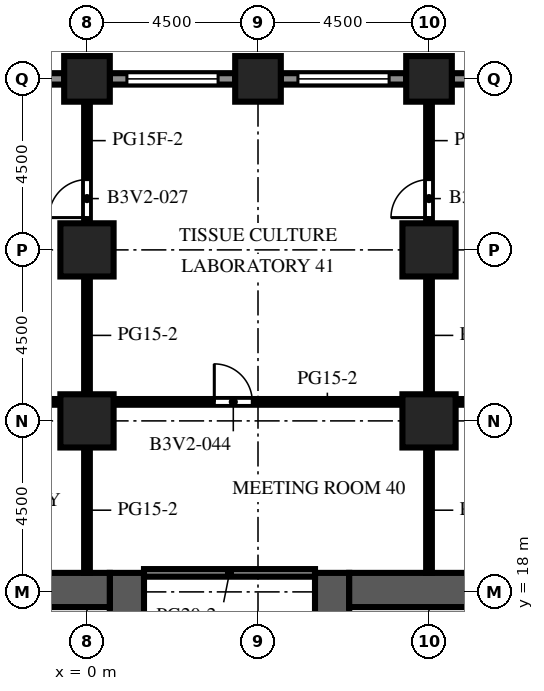
"""IFC4 building model, lengths in metres.
Left out: names, types, materials, properties, quantities, classifications, styles, units other than length and angle.
Written with IfcOpenShell. Run it as: python <this file> out.ifc"""

import sys

from ifc_helpers import new_model, si_unit, direction, frame, frame_2d, origin, origin_2d, place, context, subcontext, project, spatial, rectangle, extrude, element, fill, save


model = new_model("IFC4")
c1 = context("Model", 3, precision=1e-05, world=origin(), true_north=direction((0.0, 1.0)))
c2 = subcontext(c1, "Body", "Model", "MODEL_VIEW")
j1 = project(units=[si_unit("LENGTHUNIT", "METRE"), si_unit("PLANEANGLEUNIT", "RADIAN")], contexts=[c1])
p1 = place(None, origin())
s1 = spatial("IfcSite", under=j1, at=p1, CompositionType="ELEMENT")
p2 = place(p1, origin())
s2 = spatial("IfcBuilding", under=s1, at=p2, CompositionType="ELEMENT")
p3 = place(p2, frame((0.0, 0.0, 106.6)))
s3 = spatial("IfcBuildingStorey", under=s2, at=p3, CompositionType="ELEMENT", Elevation=106.6)
for number, where, z_axis, x_axis in (
    (1, (0.0, 31.5, 0.0), (0.0, 0.0, 1.0), (1.0, 0.0, 0.0)),
    (2, (4.5, 31.5, 0.0), (0.0, 0.0, 1.0), (1.0, 0.0, 0.0)),
    (3, (9.0, 31.5, 0.0), (0.0, 0.0, 1.0), (1.0, 0.0, 0.0)),
):
    element("IfcColumn", number, at=place(p3, frame(where, z_axis=z_axis, x_axis=x_axis)), inside=s3, PredefinedType="COLUMN", context=c2, shape_type="SweptSolid", body=[
        extrude(rectangle(XDim=1.2, YDim=1.2, at=origin_2d()), origin(), (0.0, 0.0, 1.0), 4.1),
    ])
for number, where, z_axis, x_axis in (
    (4, (0.0, 22.5, 0.0), (0.0, 0.0, 1.0), (1.0, 0.0, 0.0)),
    (5, (0.0, 27.0, 0.0), (0.0, 0.0, 1.0), (1.0, 0.0, 0.0)),
    (6, (9.0, 22.5, 0.0), (0.0, 0.0, 1.0), (1.0, 0.0, 0.0)),
    (7, (9.0, 27.0, 0.0), (0.0, 0.0, 1.0), (1.0, 0.0, 0.0)),
):
    element("IfcColumn", number, at=place(p3, frame(where, z_axis=z_axis, x_axis=x_axis)), inside=s3, PredefinedType="COLUMN", context=c2, shape_type="SweptSolid", body=[
        extrude(rectangle(XDim=1.4, YDim=1.4, at=origin_2d()), origin(), (0.0, 0.0, 1.0), 4.1),
    ])
p4 = place(p3, frame((1.05, -9.0, 0.0), z_axis=(0.0, 0.0, 1.0), x_axis=(0.0, 1.0, 0.0)))
e8 = element("IfcWall", 8, at=p4, inside=s3, PredefinedType="SHEAR", context=c2, shape_type="SweptSolid", body=[
    extrude(rectangle(XDim=27.5, YDim=0.9, at=frame_2d((13.75, 0.0))), origin(), (0.0, 0.0, 1.0), 4.1),
])
p5 = place(p4, frame((12.55, 0.0, 0.0)))
e9 = element("IfcOpeningElement", 9, at=p5, cuts=e8, PredefinedType="OPENING", context=c2, shape_type="SweptSolid", body=[
    extrude(rectangle(XDim=2.4, YDim=2.4, at=frame_2d((1.2, 1.2))), frame((0.0, 0.46, 0.0), z_axis=(0.0, -1.0, 0.0), x_axis=(1.0, 0.0, 0.0)), (0.0, 0.0, 1.0), 0.92),
])
p6 = place(p4, frame((3.893, 0.0, 0.0)))
e10 = element("IfcOpeningElement", 10, at=p6, cuts=e8, PredefinedType="OPENING", context=c2, shape_type="SweptSolid", body=[
    extrude(rectangle(XDim=0.923, YDim=2.1, at=frame_2d((0.461, 1.05))), frame((0.0, 0.46, 0.0), z_axis=(0.0, -1.0, 0.0), x_axis=(1.0, 0.0, 0.0)), (0.0, 0.0, 1.0), 0.92),
])
p7 = place(p4, frame((23.427, 0.0, 0.0)))
e11 = element("IfcOpeningElement", 11, at=p7, cuts=e8, PredefinedType="OPENING", context=c2, shape_type="SweptSolid", body=[
    extrude(rectangle(XDim=1.2, YDim=2.1, at=frame_2d((0.6, 1.05))), frame((0.0, 0.46, 0.0), z_axis=(0.0, -1.0, 0.0), x_axis=(1.0, 0.0, 0.0)), (0.0, 0.0, 1.0), 0.92),
])
p8 = place(p3, frame((-9.6, 18.05, 0.0), z_axis=(0.0, 0.0, 1.0), x_axis=(1.0, 0.0, 0.0)))
e12 = element("IfcWall", 12, at=p8, inside=s3, PredefinedType="SHEAR", context=c2, shape_type="SweptSolid", body=[
    extrude(rectangle(XDim=10.2, YDim=0.9, at=frame_2d((5.1, 0.0))), origin(), (0.0, 0.0, 1.0), 4.1),
])
p9 = place(p3, frame((6.45, -9.0, 0.0), z_axis=(0.0, 0.0, 1.0), x_axis=(0.0, 1.0, 0.0)))
e13 = element("IfcWall", 13, at=p9, inside=s3, PredefinedType="SHEAR", context=c2, shape_type="SweptSolid", body=[
    extrude(rectangle(XDim=27.5, YDim=0.9, at=frame_2d((13.75, 0.0))), origin(), (0.0, 0.0, 1.0), 4.1),
])
p10 = place(p9, frame((12.55, 0.0, 0.0)))
e14 = element("IfcOpeningElement", 14, at=p10, cuts=e13, PredefinedType="OPENING", context=c2, shape_type="SweptSolid", body=[
    extrude(rectangle(XDim=2.4, YDim=2.4, at=frame_2d((1.2, 1.2))), frame((0.0, 0.46, 0.0), z_axis=(0.0, -1.0, 0.0), x_axis=(1.0, 0.0, 0.0)), (0.0, 0.0, 1.0), 0.92),
])
p11 = place(p9, frame((3.893, 0.0, 0.0)))
e15 = element("IfcOpeningElement", 15, at=p11, cuts=e13, PredefinedType="OPENING", context=c2, shape_type="SweptSolid", body=[
    extrude(rectangle(XDim=0.923, YDim=2.1, at=frame_2d((0.461, 1.05))), frame((0.0, 0.46, 0.0), z_axis=(0.0, -1.0, 0.0), x_axis=(1.0, 0.0, 0.0)), (0.0, 0.0, 1.0), 0.92),
])
p12 = place(p9, frame((23.427, 0.0, 0.0)))
e16 = element("IfcOpeningElement", 16, at=p12, cuts=e13, PredefinedType="OPENING", context=c2, shape_type="SweptSolid", body=[
    extrude(rectangle(XDim=1.2, YDim=2.1, at=frame_2d((0.6, 1.05))), frame((0.0, 0.46, 0.0), z_axis=(0.0, -1.0, 0.0), x_axis=(1.0, 0.0, 0.0)), (0.0, 0.0, 1.0), 0.92),
])
p13 = place(p3, frame((6.9, 18.05, 0.0), z_axis=(0.0, 0.0, 1.0), x_axis=(1.0, 0.0, 0.0)))
e17 = element("IfcWall", 17, at=p13, inside=s3, PredefinedType="SHEAR", context=c2, shape_type="SweptSolid", body=[
    extrude(rectangle(XDim=10.2, YDim=0.9, at=frame_2d((5.1, 0.0))), origin(), (0.0, 0.0, 1.0), 4.1),
])
p14 = place(p3, frame((9.6, 31.5, 0.0), z_axis=(0.0, 0.0, 1.0), x_axis=(1.0, 0.0, 0.0)))
e18 = element("IfcWall", 18, at=p14, inside=s3, PredefinedType="SOLIDWALL", context=c2, shape_type="SweptSolid", body=[
    extrude(rectangle(XDim=3.3, YDim=0.3, at=frame_2d((1.65, 0.0))), origin(), (0.0, 0.0, 1.0), 2.6),
])
p15 = place(p14, frame((0.45, 0.0, 0.8)))
e19 = element("IfcOpeningElement", 19, at=p15, cuts=e18, PredefinedType="OPENING", context=c2, shape_type="SweptSolid", body=[
    extrude(rectangle(XDim=2.4, YDim=1.7, at=frame_2d((1.2, 0.85))), frame((0.0, 0.16, 0.0), z_axis=(0.0, -1.0, 0.0), x_axis=(1.0, 0.0, 0.0)), (0.0, 0.0, 1.0), 0.32),
])
p16 = place(p3, frame((5.1, 31.5, 0.0), z_axis=(0.0, 0.0, 1.0), x_axis=(1.0, 0.0, 0.0)))
e20 = element("IfcWall", 20, at=p16, inside=s3, PredefinedType="SOLIDWALL", context=c2, shape_type="SweptSolid", body=[
    extrude(rectangle(XDim=3.3, YDim=0.3, at=frame_2d((1.65, 0.0))), origin(), (0.0, 0.0, 1.0), 2.6),
])
p17 = place(p16, frame((0.45, 0.0, 0.8)))
e21 = element("IfcOpeningElement", 21, at=p17, cuts=e20, PredefinedType="OPENING", context=c2, shape_type="SweptSolid", body=[
    extrude(rectangle(XDim=2.4, YDim=1.7, at=frame_2d((1.2, 0.85))), frame((0.0, 0.16, 0.0), z_axis=(0.0, -1.0, 0.0), x_axis=(1.0, 0.0, 0.0)), (0.0, 0.0, 1.0), 0.32),
])
p18 = place(p3, frame((0.6, 31.5, 0.0), z_axis=(0.0, 0.0, 1.0), x_axis=(1.0, 0.0, 0.0)))
e22 = element("IfcWall", 22, at=p18, inside=s3, PredefinedType="SOLIDWALL", context=c2, shape_type="SweptSolid", body=[
    extrude(rectangle(XDim=3.3, YDim=0.3, at=frame_2d((1.65, 0.0))), origin(), (0.0, 0.0, 1.0), 2.6),
])
p19 = place(p18, frame((0.45, 0.0, 0.8)))
e23 = element("IfcOpeningElement", 23, at=p19, cuts=e22, PredefinedType="OPENING", context=c2, shape_type="SweptSolid", body=[
    extrude(rectangle(XDim=2.4, YDim=1.7, at=frame_2d((1.2, 0.85))), frame((0.0, 0.16, 0.0), z_axis=(0.0, -1.0, 0.0), x_axis=(1.0, 0.0, 0.0)), (0.0, 0.0, 1.0), 0.32),
])
p20 = place(p3, frame((-3.9, 31.5, 0.0), z_axis=(0.0, 0.0, 1.0), x_axis=(1.0, 0.0, 0.0)))
e24 = element("IfcWall", 24, at=p20, inside=s3, PredefinedType="SOLIDWALL", context=c2, shape_type="SweptSolid", body=[
    extrude(rectangle(XDim=3.3, YDim=0.3, at=frame_2d((1.65, 0.0))), origin(), (0.0, 0.0, 1.0), 2.6),
])
p21 = place(p20, frame((0.45, 0.0, 0.8)))
e25 = element("IfcOpeningElement", 25, at=p21, cuts=e24, PredefinedType="OPENING", context=c2, shape_type="SweptSolid", body=[
    extrude(rectangle(XDim=2.4, YDim=1.7, at=frame_2d((1.2, 0.85))), frame((0.0, 0.16, 0.0), z_axis=(0.0, -1.0, 0.0), x_axis=(1.0, 0.0, 0.0)), (0.0, 0.0, 1.0), 0.32),
])
p22 = place(p3, frame((-0.7, 15.028, 0.0), z_axis=(0.0, 0.0, 1.0), x_axis=(0.0, 1.0, 0.0)))
e26 = element("IfcWall", 26, at=p22, inside=s3, PredefinedType="PARTITIONING", context=c2, shape_type="SweptSolid", body=[
    extrude(rectangle(XDim=2.573, YDim=0.1, at=frame_2d((1.286, 0.0))), origin(), (0.0, 0.0, 1.0), 3.5),
])
p23 = place(p22, frame((0.786, 0.0, 0.0)))
e27 = element("IfcOpeningElement", 27, at=p23, cuts=e26, PredefinedType="OPENING", context=c2, shape_type="SweptSolid", body=[
    extrude(rectangle(XDim=1.0, YDim=2.1, at=frame_2d((0.5, 1.05))), frame((0.0, 0.06, 0.0), z_axis=(0.0, -1.0, 0.0), x_axis=(1.0, 0.0, 0.0)), (0.0, 0.0, 1.0), 0.12),
])
p24 = place(p3, frame((8.2, 15.028, 0.0), z_axis=(0.0, 0.0, 1.0), x_axis=(0.0, 1.0, 0.0)))
e28 = element("IfcWall", 28, at=p24, inside=s3, PredefinedType="PARTITIONING", context=c2, shape_type="SweptSolid", body=[
    extrude(rectangle(XDim=2.573, YDim=0.1, at=frame_2d((1.286, 0.0))), origin(), (0.0, 0.0, 1.0), 3.5),
])
p25 = place(p24, frame((0.786, 0.0, 0.0)))
e29 = element("IfcOpeningElement", 29, at=p25, cuts=e28, PredefinedType="OPENING", context=c2, shape_type="SweptSolid", body=[
    extrude(rectangle(XDim=1.0, YDim=2.1, at=frame_2d((0.5, 1.05))), frame((0.0, 0.06, 0.0), z_axis=(0.0, -1.0, 0.0), x_axis=(1.0, 0.0, 0.0)), (0.0, 0.0, 1.0), 0.12),
])
p26 = place(p3, frame((0.0, 18.5, 0.0), z_axis=(0.0, 0.0, 1.0), x_axis=(0.0, 1.0, 0.0)))
e30 = element("IfcWall", 30, at=p26, inside=s3, PredefinedType="PARTITIONING", context=c2, shape_type="SweptSolid", body=[
    extrude(rectangle(XDim=3.3, YDim=0.15, at=frame_2d((1.65, 0.0))), origin(), (0.0, 0.0, 1.0), 3.5),
])
p27 = place(p3, frame((0.0, 23.2, 0.0), z_axis=(0.0, 0.0, 1.0), x_axis=(0.0, 1.0, 0.0)))
e31 = element("IfcWall", 31, at=p27, inside=s3, PredefinedType="PARTITIONING", context=c2, shape_type="SweptSolid", body=[
    extrude(rectangle(XDim=3.1, YDim=0.15, at=frame_2d((1.55, 0.0))), origin(), (0.0, 0.0, 1.0), 3.5),
])
p28 = place(p3, frame((0.0, 30.9, 0.0), z_axis=(0.0, 0.0, 1.0), x_axis=(0.0, -1.0, 0.0)))
e32 = element("IfcWall", 32, at=p28, inside=s3, PredefinedType="PARTITIONING", context=c2, shape_type="SweptSolid", body=[
    extrude(rectangle(XDim=3.2, YDim=0.15, at=frame_2d((1.6, 0.0))), origin(), (0.0, 0.0, 1.0), 3.5),
])
p29 = place(p28, frame((2.05, 0.0, 0.0)))
e33 = element("IfcOpeningElement", 33, at=p29, cuts=e32, PredefinedType="OPENING", context=c2, shape_type="SweptSolid", body=[
    extrude(rectangle(XDim=1.0, YDim=2.1, at=frame_2d((0.5, 1.05))), frame((0.0, 0.085, 0.0), z_axis=(0.0, -1.0, 0.0), x_axis=(1.0, 0.0, 0.0)), (0.0, 0.0, 1.0), 0.17),
])
p30 = place(p3, frame((9.0, 18.5, 0.0), z_axis=(0.0, 0.0, 1.0), x_axis=(0.0, 1.0, 0.0)))
e34 = element("IfcWall", 34, at=p30, inside=s3, PredefinedType="PARTITIONING", context=c2, shape_type="SweptSolid", body=[
    extrude(rectangle(XDim=3.3, YDim=0.15, at=frame_2d((1.65, 0.0))), origin(), (0.0, 0.0, 1.0), 3.5),
])
p31 = place(p3, frame((9.0, 23.2, 0.0), z_axis=(0.0, 0.0, 1.0), x_axis=(0.0, 1.0, 0.0)))
e35 = element("IfcWall", 35, at=p31, inside=s3, PredefinedType="PARTITIONING", context=c2, shape_type="SweptSolid", body=[
    extrude(rectangle(XDim=3.1, YDim=0.15, at=frame_2d((1.55, 0.0))), origin(), (0.0, 0.0, 1.0), 3.5),
])
p32 = place(p3, frame((9.0, 30.9, 0.0), z_axis=(0.0, 0.0, 1.0), x_axis=(0.0, -1.0, 0.0)))
e36 = element("IfcWall", 36, at=p32, inside=s3, PredefinedType="PARTITIONING", context=c2, shape_type="SweptSolid", body=[
    extrude(rectangle(XDim=3.2, YDim=0.15, at=frame_2d((1.6, 0.0))), origin(), (0.0, 0.0, 1.0), 3.5),
])
p33 = place(p32, frame((2.05, 0.0, 0.0)))
e37 = element("IfcOpeningElement", 37, at=p33, cuts=e36, PredefinedType="OPENING", context=c2, shape_type="SweptSolid", body=[
    extrude(rectangle(XDim=1.0, YDim=2.1, at=frame_2d((0.5, 1.05))), frame((0.0, 0.085, 0.0), z_axis=(0.0, -1.0, 0.0), x_axis=(1.0, 0.0, 0.0)), (0.0, 0.0, 1.0), 0.17),
])
p34 = place(p3, frame((1.5, 18.5, 0.0), z_axis=(0.0, 0.0, 1.0), x_axis=(1.0, 0.0, 0.0)))
e38 = element("IfcWall", 38, at=p34, inside=s3, PredefinedType="PARTITIONING", context=c2, shape_type="SweptSolid", body=[
    extrude(rectangle(XDim=4.5, YDim=0.2, at=frame_2d((2.25, 0.0))), origin(), (0.0, 0.0, 1.0), 3.5),
])
p35 = place(p3, frame((-0.7, 23.0, 0.0), z_axis=(0.0, 0.0, 1.0), x_axis=(-1.0, 0.0, 0.0)))
e39 = element("IfcWall", 39, at=p35, inside=s3, PredefinedType="PARTITIONING", context=c2, shape_type="SweptSolid", body=[
    extrude(rectangle(XDim=7.6, YDim=0.15, at=frame_2d((3.8, 0.0))), origin(), (0.0, 0.0, 1.0), 3.5),
])
p36 = place(p35, frame((5.45, 0.0, 0.0)))
e40 = element("IfcOpeningElement", 40, at=p36, cuts=e39, PredefinedType="OPENING", context=c2, shape_type="SweptSolid", body=[
    extrude(rectangle(XDim=1.0, YDim=2.1, at=frame_2d((0.5, 1.05))), frame((0.0, 0.085, 0.0), z_axis=(0.0, -1.0, 0.0), x_axis=(1.0, 0.0, 0.0)), (0.0, 0.0, 1.0), 0.17),
])
p37 = place(p35, frame((0.95, 0.0, 0.0)))
e41 = element("IfcOpeningElement", 41, at=p37, cuts=e39, PredefinedType="OPENING", context=c2, shape_type="SweptSolid", body=[
    extrude(rectangle(XDim=1.0, YDim=2.1, at=frame_2d((0.5, 1.05))), frame((0.0, 0.085, 0.0), z_axis=(0.0, -1.0, 0.0), x_axis=(1.0, 0.0, 0.0)), (0.0, 0.0, 1.0), 0.17),
])
p38 = place(p3, frame((8.3, 23.0, 0.0), z_axis=(0.0, 0.0, 1.0), x_axis=(-1.0, 0.0, 0.0)))
e42 = element("IfcWall", 42, at=p38, inside=s3, PredefinedType="PARTITIONING", context=c2, shape_type="SweptSolid", body=[
    extrude(rectangle(XDim=7.6, YDim=0.15, at=frame_2d((3.8, 0.0))), origin(), (0.0, 0.0, 1.0), 3.5),
])
p39 = place(p38, frame((3.95, 0.0, 0.0)))
e43 = element("IfcOpeningElement", 43, at=p39, cuts=e42, PredefinedType="OPENING", context=c2, shape_type="SweptSolid", body=[
    extrude(rectangle(XDim=1.0, YDim=2.1, at=frame_2d((0.5, 1.05))), frame((0.0, 0.085, 0.0), z_axis=(0.0, -1.0, 0.0), x_axis=(1.0, 0.0, 0.0)), (0.0, 0.0, 1.0), 0.17),
])
p40 = place(p3, frame((17.3, 23.0, 0.0), z_axis=(0.0, 0.0, 1.0), x_axis=(-1.0, 0.0, 0.0)))
e44 = element("IfcWall", 44, at=p40, inside=s3, PredefinedType="PARTITIONING", context=c2, shape_type="SweptSolid", body=[
    extrude(rectangle(XDim=7.6, YDim=0.15, at=frame_2d((3.8, 0.0))), origin(), (0.0, 0.0, 1.0), 3.5),
])
p41 = place(p40, frame((5.7, 0.0, 0.0)))
e45 = element("IfcOpeningElement", 45, at=p41, cuts=e44, PredefinedType="OPENING", context=c2, shape_type="SweptSolid", body=[
    extrude(rectangle(XDim=1.0, YDim=2.1, at=frame_2d((0.5, 1.05))), frame((0.0, 0.085, 0.0), z_axis=(0.0, -1.0, 0.0), x_axis=(1.0, 0.0, 0.0)), (0.0, 0.0, 1.0), 0.17),
])
p42 = place(p40, frame((1.45, 0.0, 0.0)))
e46 = element("IfcOpeningElement", 46, at=p42, cuts=e44, PredefinedType="OPENING", context=c2, shape_type="SweptSolid", body=[
    extrude(rectangle(XDim=1.0, YDim=2.1, at=frame_2d((0.5, 1.05))), frame((0.0, 0.085, 0.0), z_axis=(0.0, -1.0, 0.0), x_axis=(1.0, 0.0, 0.0)), (0.0, 0.0, 1.0), 0.17),
])
p43 = place(p17, origin())
e47 = element("IfcWindow", 47, at=p43, inside=s3, PartitioningType="SINGLE_PANEL", PredefinedType="WINDOW", context=c2, shape_type="SweptSolid", body=[
    extrude(rectangle(XDim=2.4, YDim=1.7, at=frame_2d((1.2, 0.85))), frame((0.0, 0.03, 0.0), z_axis=(0.0, -1.0, 0.0), x_axis=(1.0, 0.0, 0.0)), (0.0, 0.0, 1.0), 0.06),
])
fill(e21, e47)
p44 = place(p19, origin())
e48 = element("IfcWindow", 48, at=p44, inside=s3, PartitioningType="SINGLE_PANEL", PredefinedType="WINDOW", context=c2, shape_type="SweptSolid", body=[
    extrude(rectangle(XDim=2.4, YDim=1.7, at=frame_2d((1.2, 0.85))), frame((0.0, 0.03, 0.0), z_axis=(0.0, -1.0, 0.0), x_axis=(1.0, 0.0, 0.0)), (0.0, 0.0, 1.0), 0.06),
])
fill(e23, e48)
p45 = place(p29, origin())
e49 = element("IfcDoor", 49, at=p45, inside=s3, OperationType="SINGLE_SWING_RIGHT", PredefinedType="DOOR", context=c2, shape_type="SweptSolid", body=[
    extrude(rectangle(XDim=1.0, YDim=2.1, at=frame_2d((0.5, 1.05))), frame((0.0, 0.025, 0.0), z_axis=(0.0, -1.0, 0.0), x_axis=(1.0, 0.0, 0.0)), (0.0, 0.0, 1.0), 0.05),
])
fill(e33, e49)
p46 = place(p33, origin())
e50 = element("IfcDoor", 50, at=p46, inside=s3, OperationType="SINGLE_SWING_RIGHT", PredefinedType="DOOR", context=c2, shape_type="SweptSolid", body=[
    extrude(rectangle(XDim=1.0, YDim=2.1, at=frame_2d((0.5, 1.05))), frame((0.0, 0.025, 0.0), z_axis=(0.0, -1.0, 0.0), x_axis=(1.0, 0.0, 0.0)), (0.0, 0.0, 1.0), 0.05),
])
fill(e37, e50)
p47 = place(p39, origin())
e51 = element("IfcDoor", 51, at=p47, inside=s3, OperationType="SINGLE_SWING_RIGHT", PredefinedType="DOOR", context=c2, shape_type="SweptSolid", body=[
    extrude(rectangle(XDim=1.0, YDim=2.1, at=frame_2d((0.5, 1.05))), frame((0.0, 0.025, 0.0), z_axis=(0.0, -1.0, 0.0), x_axis=(1.0, 0.0, 0.0)), (0.0, 0.0, 1.0), 0.05),
])
fill(e43, e51)
save(model, sys.argv[1])
